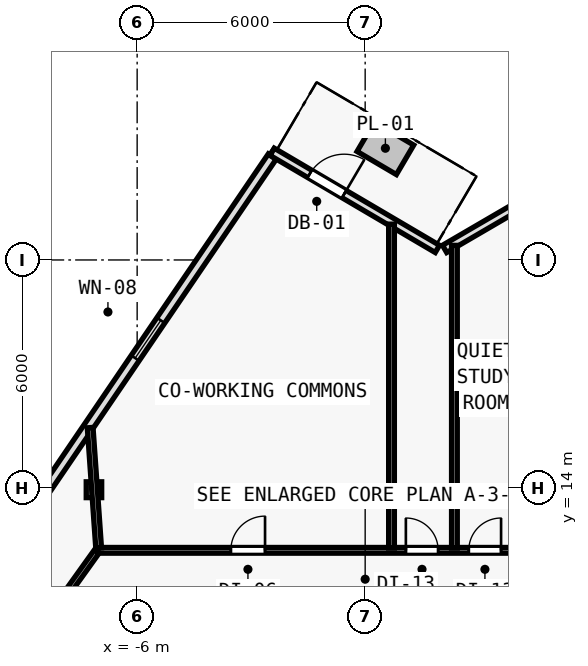
"""IFC4 building model, lengths in metres.
Left out: names, types, materials, properties, quantities, classifications, styles, units other than length and angle.
Written with IfcOpenShell. Run it as: python <this file> out.ifc"""

import sys

from ifc_helpers import new_model, si_unit, direction, frame, frame_2d, origin, origin_2d, place, context, subcontext, project, spatial, rectangle, i_section, extrude, element, fill, save


model = new_model("IFC4")
c1 = context("Model", 3, precision=1e-05, world=origin(), true_north=direction((0.0, 1.0)))
c2 = subcontext(c1, "Body", "Model", "MODEL_VIEW")
j1 = project(units=[si_unit("LENGTHUNIT", "METRE"), si_unit("PLANEANGLEUNIT", "RADIAN")], contexts=[c1])
p1 = place(None, origin())
s1 = spatial("IfcSite", under=j1, at=p1, CompositionType="ELEMENT")
p2 = place(p1, origin())
s2 = spatial("IfcBuilding", under=s1, at=p2, CompositionType="ELEMENT")
p3 = place(p2, frame((0.0, 0.0, 125.7)))
s3 = spatial("IfcBuildingStorey", under=s2, at=p3, CompositionType="ELEMENT", Elevation=125.7)
p4 = place(p3, frame((-7.137, 13.954, 0.006), z_axis=(0.008843163607, -0.002516900411, 0.999957730942), x_axis=(0.273743828055, 0.961802639112, 0.0)))
e1 = element("IfcColumn", 1, at=p4, inside=s3, PredefinedType="COLUMN", context=c2, shape_type="SweptSolid", body=[
    extrude(i_section(OverallWidth=0.406, OverallDepth=0.416, WebThickness=0.019, FlangeThickness=0.031, FilletRadius=0.015, at=origin_2d()), origin(), (0.0, 0.0, 1.0), 3.589),
])
p5 = place(p3, frame((-8.984, 13.108, 0.0), z_axis=(0.0, 0.0, 1.0), x_axis=(0.562459365703, 0.826824928225, 0.0)))
e2 = element("IfcWall", 2, at=p5, inside=s3, PredefinedType="SOLIDWALL", context=c2, shape_type="SweptSolid", body=[
    extrude(rectangle(XDim=11.625, YDim=0.25, at=frame_2d((5.812, 0.0))), origin(), (0.0, 0.0, 1.0), 3.28),
])
p6 = place(p5, frame((5.212, 0.0, 0.62)))
e3 = element("IfcOpeningElement", 3, at=p6, cuts=e2, PredefinedType="OPENING", context=c2, shape_type="SweptSolid", body=[
    extrude(rectangle(XDim=1.2, YDim=1.8, at=frame_2d((0.6, 0.9))), frame((0.0, 0.135, 0.0), z_axis=(0.0, -1.0, 0.0), x_axis=(1.0, 0.0, 0.0)), (0.0, 0.0, 1.0), 0.27),
])
p7 = place(p3, frame((2.09, 20.291, 0.0), z_axis=(0.0, 0.0, 1.0), x_axis=(0.863978647835, 0.503528446153, 0.0)))
e4 = element("IfcWall", 4, at=p7, inside=s3, PredefinedType="SOLIDWALL", context=c2, shape_type="SweptSolid", body=[
    extrude(rectangle(XDim=4.564, YDim=0.22, at=frame_2d((2.282, 0.0))), origin(), (0.0, 0.0, 1.0), 3.28),
])
p8 = place(p3, frame((-2.447, 22.846, 0.0), z_axis=(0.0, 0.0, 1.0), x_axis=(0.8621357974, -0.506677280763, 0.0)))
e5 = element("IfcWall", 5, at=p8, inside=s3, PredefinedType="SOLIDWALL", context=c2, shape_type="SweptSolid", body=[
    extrude(rectangle(XDim=5.042, YDim=0.22, at=frame_2d((2.521, 0.0))), origin(), (0.0, 0.0, 1.0), 3.28),
])
p9 = place(p8, frame((1.146, 0.0, 0.0)))
e6 = element("IfcOpeningElement", 6, at=p9, cuts=e5, PredefinedType="OPENING", context=c2, shape_type="SweptSolid", body=[
    extrude(rectangle(XDim=1.05, YDim=2.15, at=frame_2d((0.525, 1.075))), frame((0.0, 0.12, 0.0), z_axis=(0.0, -1.0, 0.0), x_axis=(1.0, 0.0, 0.0)), (0.0, 0.0, 1.0), 0.24),
])
p10 = place(p3, frame((-9.86, 8.426, 0.0), z_axis=(0.0, 0.0, 1.0), x_axis=(0.582449511476, 0.812866881218, 0.0)))
e7 = element("IfcWall", 7, at=p10, inside=s3, PredefinedType="PARTITIONING", context=c2, shape_type="SweptSolid", body=[
    extrude(rectangle(XDim=4.84, YDim=0.15, at=frame_2d((2.42, 0.0))), origin(), (0.0, 0.0, 1.0), 2.895),
])
p11 = place(p3, frame((-7.041, 12.36, 0.0), z_axis=(0.0, 0.0, 1.0), x_axis=(1.0, 0.0, 0.0)))
e8 = element("IfcWall", 8, at=p11, inside=s3, PredefinedType="PARTITIONING", context=c2, shape_type="SweptSolid", body=[
    extrude(rectangle(XDim=14.064, YDim=0.15, at=frame_2d((7.032, 0.0))), origin(), (0.0, 0.0, 1.0), 3.28),
])
p12 = place(p11, frame((12.016, 0.0, 0.0)))
e9 = element("IfcOpeningElement", 9, at=p12, cuts=e8, PredefinedType="OPENING", context=c2, shape_type="SweptSolid", body=[
    extrude(rectangle(XDim=0.9, YDim=2.1, at=frame_2d((0.45, 1.05))), frame((0.0, 0.085, 0.0), z_axis=(0.0, -1.0, 0.0), x_axis=(1.0, 0.0, 0.0)), (0.0, 0.0, 1.0), 0.17),
])
p13 = place(p11, frame((9.767, 0.0, 0.0)))
e10 = element("IfcOpeningElement", 10, at=p13, cuts=e8, PredefinedType="OPENING", context=c2, shape_type="SweptSolid", body=[
    extrude(rectangle(XDim=0.85, YDim=2.1, at=frame_2d((0.425, 1.05))), frame((0.0, 0.085, 0.0), z_axis=(0.0, -1.0, 0.0), x_axis=(1.0, 0.0, 0.0)), (0.0, 0.0, 1.0), 0.17),
])
p14 = place(p11, frame((8.112, 0.0, 0.0)))
e11 = element("IfcOpeningElement", 11, at=p14, cuts=e8, PredefinedType="OPENING", context=c2, shape_type="SweptSolid", body=[
    extrude(rectangle(XDim=0.85, YDim=2.1, at=frame_2d((0.425, 1.05))), frame((0.0, 0.085, 0.0), z_axis=(0.0, -1.0, 0.0), x_axis=(1.0, 0.0, 0.0)), (0.0, 0.0, 1.0), 0.17),
])
p15 = place(p11, frame((3.506, 0.0, 0.0)))
e12 = element("IfcOpeningElement", 12, at=p15, cuts=e8, PredefinedType="OPENING", context=c2, shape_type="SweptSolid", body=[
    extrude(rectangle(XDim=0.9, YDim=2.1, at=frame_2d((0.45, 1.05))), frame((0.0, 0.085, 0.0), z_axis=(0.0, -1.0, 0.0), x_axis=(1.0, 0.0, 0.0)), (0.0, 0.0, 1.0), 0.17),
])
p16 = place(p3, frame((-7.013, 12.419, 0.0), z_axis=(0.0, 0.0, 1.0), x_axis=(-0.070149488987, 0.997536490157, 0.0)))
e13 = element("IfcWall", 13, at=p16, inside=s3, PredefinedType="PARTITIONING", context=c2, shape_type="SweptSolid", body=[
    extrude(rectangle(XDim=3.177, YDim=0.15, at=frame_2d((1.589, 0.0))), origin(), (0.0, 0.0, 1.0), 2.815),
])
p17 = place(p3, frame((0.693, 12.42, 0.0), z_axis=(0.0, 0.0, 1.0), x_axis=(0.0, 1.0, 0.0)))
e14 = element("IfcWall", 14, at=p17, inside=s3, PredefinedType="PARTITIONING", context=c2, shape_type="SweptSolid", body=[
    extrude(rectangle(XDim=8.522, YDim=0.15, at=frame_2d((4.261, 0.0))), origin(), (0.0, 0.0, 1.0), 2.815),
])
p18 = place(p3, frame((2.349, 12.42, 0.0), z_axis=(0.0, 0.0, 1.0), x_axis=(0.0, 1.0, 0.0)))
e15 = element("IfcWall", 15, at=p18, inside=s3, PredefinedType="PARTITIONING", context=c2, shape_type="SweptSolid", body=[
    extrude(rectangle(XDim=7.963, YDim=0.15, at=frame_2d((3.982, 0.0))), origin(), (0.0, 0.0, 1.0), 2.815),
])
p19 = place(p6, origin())
e16 = element("IfcWindow", 16, at=p19, inside=s3, PartitioningType="SINGLE_PANEL", PredefinedType="WINDOW", context=c2, shape_type="SweptSolid", body=[
    extrude(rectangle(XDim=1.2, YDim=1.8, at=frame_2d((0.6, 0.9))), frame((0.0, 0.03, 0.0), z_axis=(0.0, -1.0, 0.0), x_axis=(1.0, 0.0, 0.0)), (0.0, 0.0, 1.0), 0.06),
])
fill(e3, e16)
p20 = place(p9, origin())
e17 = element("IfcDoor", 17, at=p20, inside=s3, OperationType="SINGLE_SWING_RIGHT", PredefinedType="DOOR", context=c2, shape_type="SweptSolid", body=[
    extrude(rectangle(XDim=1.05, YDim=2.15, at=frame_2d((0.525, 1.075))), frame((0.0, 0.025, 0.0), z_axis=(0.0, -1.0, 0.0), x_axis=(1.0, 0.0, 0.0)), (0.0, 0.0, 1.0), 0.05),
])
fill(e6, e17)
p21 = place(p13, origin())
e18 = element("IfcDoor", 18, at=p21, inside=s3, OperationType="SINGLE_SWING_RIGHT", PredefinedType="DOOR", context=c2, shape_type="SweptSolid", body=[
    extrude(rectangle(XDim=0.85, YDim=2.1, at=frame_2d((0.425, 1.05))), frame((0.0, 0.025, 0.0), z_axis=(0.0, -1.0, 0.0), x_axis=(1.0, 0.0, 0.0)), (0.0, 0.0, 1.0), 0.05),
])
fill(e10, e18)
p22 = place(p14, origin())
e19 = element("IfcDoor", 19, at=p22, inside=s3, OperationType="SINGLE_SWING_LEFT", PredefinedType="DOOR", context=c2, shape_type="SweptSolid", body=[
    extrude(rectangle(XDim=0.85, YDim=2.1, at=frame_2d((0.425, 1.05))), frame((0.0, 0.025, 0.0), z_axis=(0.0, -1.0, 0.0), x_axis=(1.0, 0.0, 0.0)), (0.0, 0.0, 1.0), 0.05),
])
fill(e11, e19)
p23 = place(p15, origin())
e20 = element("IfcDoor", 20, at=p23, inside=s3, OperationType="SINGLE_SWING_RIGHT", PredefinedType="DOOR", context=c2, shape_type="SweptSolid", body=[
    extrude(rectangle(XDim=0.9, YDim=2.1, at=frame_2d((0.45, 1.05))), frame((0.0, 0.025, 0.0), z_axis=(0.0, -1.0, 0.0), x_axis=(1.0, 0.0, 0.0)), (0.0, 0.0, 1.0), 0.05),
])
fill(e12, e20)
save(model, sys.argv[1])
